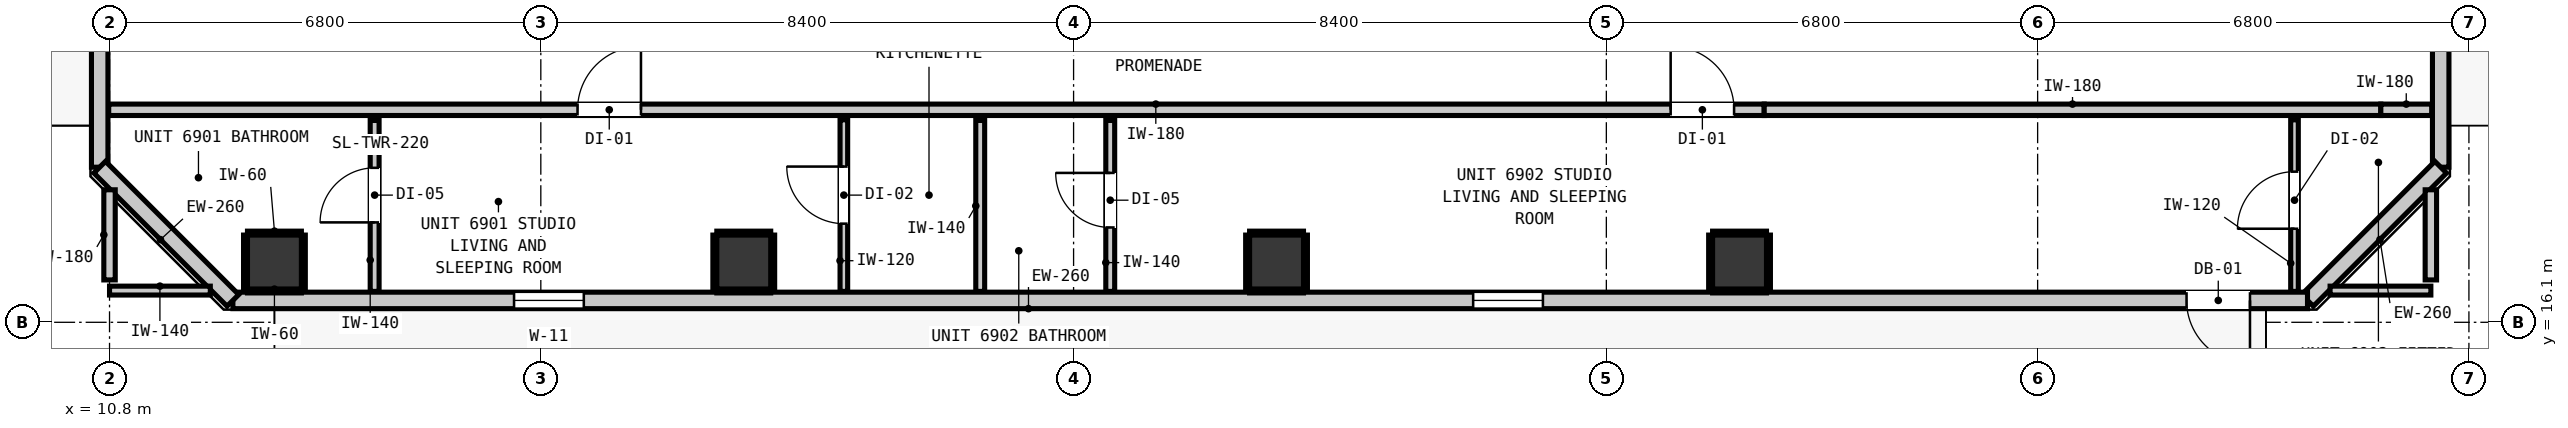
"""IFC4 building model, lengths in metres.
Left out: names, types, materials, properties, quantities, classifications, styles, units other than length and angle.
Written with IfcOpenShell. Run it as: python <this file> out.ifc"""

import sys

from ifc_helpers import new_model, si_unit, direction, frame, frame_2d, origin, origin_2d, place, context, subcontext, project, spatial, rectangle, extrude, element, fill, save


model = new_model("IFC4")
c1 = context("Model", 3, precision=1e-05, world=origin(), true_north=direction((0.0, 1.0)))
c2 = subcontext(c1, "Body", "Model", "MODEL_VIEW")
j1 = project(units=[si_unit("LENGTHUNIT", "METRE"), si_unit("PLANEANGLEUNIT", "RADIAN")], contexts=[c1])
p1 = place(None, origin())
s1 = spatial("IfcSite", under=j1, at=p1, CompositionType="ELEMENT")
p2 = place(p1, origin())
s2 = spatial("IfcBuilding", under=s1, at=p2, CompositionType="ELEMENT")
p3 = place(p2, frame((0.0, 0.0, 237.92)))
s3 = spatial("IfcBuildingStorey", under=s2, at=p3, CompositionType="ELEMENT", Elevation=237.92)
for number, where, z_axis, x_axis in (
    (1, (13.4, 17.05, 0.0), (0.0, 0.0, 1.0), (1.0, 0.0, 0.0)),
    (2, (20.8, 17.05, 0.0), (0.0, 0.0, 1.0), (1.0, 0.0, 0.0)),
    (3, (29.2, 17.05, 0.0), (0.0, 0.0, 1.0), (1.0, 0.0, 0.0)),
    (4, (36.5, 17.05, 0.0), (0.0, 0.0, 1.0), (1.0, 0.0, 0.0)),
):
    element("IfcColumn", number, at=place(p3, frame(where, z_axis=z_axis, x_axis=x_axis)), inside=s3, PredefinedType="COLUMN", context=c2, shape_type="SweptSolid", body=[
        extrude(rectangle(XDim=0.85, YDim=0.85, at=origin_2d()), origin(), (0.0, 0.0, 1.0), 3.32),
    ])
p4 = place(p3, frame((10.645, 18.545, 0.0), z_axis=(0.0, 0.0, 1.0), x_axis=(0.0, 1.0, 0.0)))
e5 = element("IfcWall", 5, at=p4, inside=s3, PredefinedType="STANDARD", context=c2, shape_type="SweptSolid", body=[
    extrude(rectangle(XDim=30.31, YDim=0.26, at=frame_2d((15.155, 0.0))), origin(), (0.0, 0.0, 1.0), 3.1),
])
p5 = place(p4, frame((27.695, 0.0, 0.0)))
e6 = element("IfcOpeningElement", 6, at=p5, cuts=e5, PredefinedType="OPENING", context=c2, shape_type="SweptSolid", body=[
    extrude(rectangle(XDim=1.0, YDim=2.15, at=frame_2d((0.5, 1.075))), frame((0.0, 0.14, 0.0), z_axis=(0.0, -1.0, 0.0), x_axis=(1.0, 0.0, 0.0)), (0.0, 0.0, 1.0), 0.28),
])
p6 = place(p4, frame((29.108, 0.0, 0.85)))
e7 = element("IfcOpeningElement", 7, at=p6, cuts=e5, PredefinedType="OPENING", context=c2, shape_type="SweptSolid", body=[
    extrude(rectangle(XDim=0.9, YDim=1.5, at=frame_2d((0.45, 0.75))), frame((0.0, 0.14, 0.0), z_axis=(0.0, -1.0, 0.0), x_axis=(1.0, 0.0, 0.0)), (0.0, 0.0, 1.0), 0.28),
])
p7 = place(p3, frame((47.555, 48.855, 0.0), z_axis=(0.0, 0.0, 1.0), x_axis=(0.0, -1.0, 0.0)))
e8 = element("IfcWall", 8, at=p7, inside=s3, PredefinedType="STANDARD", context=c2, shape_type="SweptSolid", body=[
    extrude(rectangle(XDim=30.31, YDim=0.26, at=frame_2d((15.155, 0.0))), origin(), (0.0, 0.0, 1.0), 3.1),
])
p8 = place(p7, frame((0.91, 0.0, 0.0)))
e9 = element("IfcOpeningElement", 9, at=p8, cuts=e8, PredefinedType="OPENING", context=c2, shape_type="SweptSolid", body=[
    extrude(rectangle(XDim=1.0, YDim=2.15, at=frame_2d((0.5, 1.075))), frame((0.0, 0.14, 0.0), z_axis=(0.0, -1.0, 0.0), x_axis=(1.0, 0.0, 0.0)), (0.0, 0.0, 1.0), 0.28),
])
p9 = place(p7, frame((3.907, 0.0, 0.85)))
e10 = element("IfcOpeningElement", 10, at=p9, cuts=e8, PredefinedType="OPENING", context=c2, shape_type="SweptSolid", body=[
    extrude(rectangle(XDim=1.1, YDim=2.05, at=frame_2d((0.55, 1.025))), frame((0.0, 0.14, 0.0), z_axis=(0.0, -1.0, 0.0), x_axis=(1.0, 0.0, 0.0)), (0.0, 0.0, 1.0), 0.28),
])
p10 = place(p7, frame((21.955, 0.0, 0.85)))
e11 = element("IfcOpeningElement", 11, at=p10, cuts=e8, PredefinedType="OPENING", context=c2, shape_type="SweptSolid", body=[
    extrude(rectangle(XDim=1.1, YDim=2.05, at=frame_2d((0.55, 1.025))), frame((0.0, 0.14, 0.0), z_axis=(0.0, -1.0, 0.0), x_axis=(1.0, 0.0, 0.0)), (0.0, 0.0, 1.0), 0.28),
])
p11 = place(p3, frame((47.555, 18.545, 0.0), z_axis=(0.0, 0.0, 1.0), x_axis=(-0.707106781187, -0.707106781187, 0.0)))
e12 = element("IfcWall", 12, at=p11, inside=s3, PredefinedType="STANDARD", context=c2, shape_type="SweptSolid", body=[
    extrude(rectangle(XDim=2.97, YDim=0.26, at=frame_2d((1.485, 0.0))), origin(), (0.0, 0.0, 1.0), 3.1),
])
p12 = place(p3, frame((45.455, 16.445, 0.0), z_axis=(0.0, 0.0, 1.0), x_axis=(-1.0, 0.0, 0.0)))
e13 = element("IfcWall", 13, at=p12, inside=s3, PredefinedType="STANDARD", context=c2, shape_type="SweptSolid", body=[
    extrude(rectangle(XDim=32.71, YDim=0.26, at=frame_2d((16.355, 0.0))), origin(), (0.0, 0.0, 1.0), 3.1),
])
p13 = place(p12, frame((0.907, 0.0, 0.0)))
e14 = element("IfcOpeningElement", 14, at=p13, cuts=e13, PredefinedType="OPENING", context=c2, shape_type="SweptSolid", body=[
    extrude(rectangle(XDim=1.0, YDim=2.15, at=frame_2d((0.5, 1.075))), frame((0.0, 0.14, 0.0), z_axis=(0.0, -1.0, 0.0), x_axis=(1.0, 0.0, 0.0)), (0.0, 0.0, 1.0), 0.28),
])
p14 = place(p12, frame((27.177, 0.0, 0.85)))
e15 = element("IfcOpeningElement", 15, at=p14, cuts=e13, PredefinedType="OPENING", context=c2, shape_type="SweptSolid", body=[
    extrude(rectangle(XDim=1.1, YDim=2.05, at=frame_2d((0.55, 1.025))), frame((0.0, 0.14, 0.0), z_axis=(0.0, -1.0, 0.0), x_axis=(1.0, 0.0, 0.0)), (0.0, 0.0, 1.0), 0.28),
])
p15 = place(p12, frame((12.055, 0.0, 0.85)))
e16 = element("IfcOpeningElement", 16, at=p15, cuts=e13, PredefinedType="OPENING", context=c2, shape_type="SweptSolid", body=[
    extrude(rectangle(XDim=1.1, YDim=2.05, at=frame_2d((0.55, 1.025))), frame((0.0, 0.14, 0.0), z_axis=(0.0, -1.0, 0.0), x_axis=(1.0, 0.0, 0.0)), (0.0, 0.0, 1.0), 0.28),
])
p16 = place(p3, frame((12.745, 16.445, 0.0), z_axis=(0.0, 0.0, 1.0), x_axis=(-0.707147883682, 0.707065676302, 0.0)))
e17 = element("IfcWall", 17, at=p16, inside=s3, PredefinedType="STANDARD", context=c2, shape_type="SweptSolid", body=[
    extrude(rectangle(XDim=2.97, YDim=0.26, at=frame_2d((1.485, 0.0))), origin(), (0.0, 0.0, 1.0), 3.1),
])
p17 = place(p3, frame((10.787, 19.45, 0.0), z_axis=(0.0, 0.0, 1.0), x_axis=(1.0, 0.0, 0.0)))
e18 = element("IfcWall", 18, at=p17, inside=s3, PredefinedType="PARTITIONING", context=c2, shape_type="SweptSolid", body=[
    extrude(rectangle(XDim=26.102, YDim=0.18, at=frame_2d((13.051, 0.0))), origin(), (0.0, 0.0, 1.0), 3.1),
])
p18 = place(p17, frame((7.392, 0.0, 0.0)))
e19 = element("IfcOpeningElement", 19, at=p18, cuts=e18, PredefinedType="OPENING", context=c2, shape_type="SweptSolid", body=[
    extrude(rectangle(XDim=1.0, YDim=2.15, at=frame_2d((0.5, 1.075))), frame((0.0, 0.1, 0.0), z_axis=(0.0, -1.0, 0.0), x_axis=(1.0, 0.0, 0.0)), (0.0, 0.0, 1.0), 0.2),
])
p19 = place(p17, frame((24.627, 0.0, 0.0)))
e20 = element("IfcOpeningElement", 20, at=p19, cuts=e18, PredefinedType="OPENING", context=c2, shape_type="SweptSolid", body=[
    extrude(rectangle(XDim=1.0, YDim=2.15, at=frame_2d((0.5, 1.075))), frame((0.0, 0.1, 0.0), z_axis=(0.0, -1.0, 0.0), x_axis=(1.0, 0.0, 0.0)), (0.0, 0.0, 1.0), 0.2),
])
p20 = place(p3, frame((36.889, 19.45, 0.0), z_axis=(0.0, 0.0, 1.0), x_axis=(1.0, 0.0, 0.0)))
e21 = element("IfcWall", 21, at=p20, inside=s3, PredefinedType="PARTITIONING", context=c2, shape_type="SweptSolid", body=[
    extrude(rectangle(XDim=9.722, YDim=0.18, at=frame_2d((4.861, 0.0))), origin(), (0.0, 0.0, 1.0), 2.477),
])
p21 = place(p3, frame((46.611, 19.45, 0.0), z_axis=(0.0, 0.0, 1.0), x_axis=(1.0, 0.0, 0.0)))
e22 = element("IfcWall", 22, at=p21, inside=s3, PredefinedType="PARTITIONING", context=c2, shape_type="SweptSolid", body=[
    extrude(rectangle(XDim=0.802, YDim=0.18, at=frame_2d((0.401, 0.0))), origin(), (0.0, 0.0, 1.0), 3.1),
])
for number, where, z_axis, x_axis in (
    (23, (10.8, 16.6, 0.0), (0.0, 0.0, 1.0), (1.0, 0.0, 0.0)),
    (24, (45.811, 16.6, 0.0), (0.0, 0.0, 1.0), (1.0, 0.0, 0.0)),
):
    element("IfcWall", number, at=place(p3, frame(where, z_axis=z_axis, x_axis=x_axis)), inside=s3, PredefinedType="PARTITIONING", context=c2, shape_type="SweptSolid", body=[
        extrude(rectangle(XDim=1.589, YDim=0.14, at=frame_2d((0.794, 0.0))), origin(), (0.0, 0.0, 1.0), 3.1),
    ])
for number, where, z_axis, x_axis in (
    (25, (10.8, 16.768, 0.0), (0.0, 0.0, 1.0), (0.0, 1.0, 0.0)),
    (26, (47.4, 16.768, 0.0), (0.0, 0.0, 1.0), (0.0, 1.0, 0.0)),
):
    element("IfcWall", number, at=place(p3, frame(where, z_axis=z_axis, x_axis=x_axis)), inside=s3, PredefinedType="PARTITIONING", context=c2, shape_type="SweptSolid", body=[
        extrude(rectangle(XDim=1.421, YDim=0.18, at=frame_2d((0.71, 0.0))), origin(), (0.0, 0.0, 1.0), 3.1),
    ])
p22 = place(p3, frame((14.98, 16.587, 0.0), z_axis=(0.0, 0.0, 1.0), x_axis=(0.0, 1.0, 0.0)))
e27 = element("IfcWall", 27, at=p22, inside=s3, PredefinedType="PARTITIONING", context=c2, shape_type="SweptSolid", body=[
    extrude(rectangle(XDim=2.695, YDim=0.14, at=frame_2d((1.348, 0.0))), origin(), (0.0, 0.0, 1.0), 3.1),
])
p23 = place(p22, frame((1.088, 0.0, 0.0)))
e28 = element("IfcOpeningElement", 28, at=p23, cuts=e27, PredefinedType="OPENING", context=c2, shape_type="SweptSolid", body=[
    extrude(rectangle(XDim=0.86, YDim=2.02, at=frame_2d((0.43, 1.01))), frame((0.0, 0.08, 0.0), z_axis=(0.0, -1.0, 0.0), x_axis=(1.0, 0.0, 0.0)), (0.0, 0.0, 1.0), 0.16),
])
p24 = place(p3, frame((24.528, 16.587, 0.0), z_axis=(0.0, 0.0, 1.0), x_axis=(0.0, 1.0, 0.0)))
e29 = element("IfcWall", 29, at=p24, inside=s3, PredefinedType="PARTITIONING", context=c2, shape_type="SweptSolid", body=[
    extrude(rectangle(XDim=2.695, YDim=0.14, at=frame_2d((1.348, 0.0))), origin(), (0.0, 0.0, 1.0), 3.1),
])
p25 = place(p3, frame((26.578, 16.587, 0.0), z_axis=(0.0, 0.0, 1.0), x_axis=(0.0, 1.0, 0.0)))
e30 = element("IfcWall", 30, at=p25, inside=s3, PredefinedType="PARTITIONING", context=c2, shape_type="SweptSolid", body=[
    extrude(rectangle(XDim=2.695, YDim=0.14, at=frame_2d((1.348, 0.0))), origin(), (0.0, 0.0, 1.0), 3.1),
])
p26 = place(p25, frame((1.008, 0.0, 0.0)))
e31 = element("IfcOpeningElement", 31, at=p26, cuts=e30, PredefinedType="OPENING", context=c2, shape_type="SweptSolid", body=[
    extrude(rectangle(XDim=0.86, YDim=2.02, at=frame_2d((0.43, 1.01))), frame((0.0, 0.08, 0.0), z_axis=(0.0, -1.0, 0.0), x_axis=(1.0, 0.0, 0.0)), (0.0, 0.0, 1.0), 0.16),
])
p27 = place(p3, frame((22.378, 16.587, 0.0), z_axis=(0.0, 0.0, 1.0), x_axis=(0.0, 1.0, 0.0)))
e32 = element("IfcWall", 32, at=p27, inside=s3, PredefinedType="PARTITIONING", context=c2, shape_type="SweptSolid", body=[
    extrude(rectangle(XDim=2.705, YDim=0.12, at=frame_2d((1.353, 0.0))), origin(), (0.0, 0.0, 1.0), 3.1),
])
p28 = place(p27, frame((1.068, 0.0, 0.0)))
e33 = element("IfcOpeningElement", 33, at=p28, cuts=e32, PredefinedType="OPENING", context=c2, shape_type="SweptSolid", body=[
    extrude(rectangle(XDim=0.9, YDim=2.1, at=frame_2d((0.45, 1.05))), frame((0.0, 0.07, 0.0), z_axis=(0.0, -1.0, 0.0), x_axis=(1.0, 0.0, 0.0)), (0.0, 0.0, 1.0), 0.14),
])
p29 = place(p3, frame((45.25, 16.587, 0.0), z_axis=(0.0, 0.0, 1.0), x_axis=(0.0, 1.0, 0.0)))
e34 = element("IfcWall", 34, at=p29, inside=s3, PredefinedType="PARTITIONING", context=c2, shape_type="SweptSolid", body=[
    extrude(rectangle(XDim=2.705, YDim=0.12, at=frame_2d((1.353, 0.0))), origin(), (0.0, 0.0, 1.0), 3.1),
])
p30 = place(p29, frame((0.988, 0.0, 0.0)))
e35 = element("IfcOpeningElement", 35, at=p30, cuts=e34, PredefinedType="OPENING", context=c2, shape_type="SweptSolid", body=[
    extrude(rectangle(XDim=0.9, YDim=2.1, at=frame_2d((0.45, 1.05))), frame((0.0, 0.07, 0.0), z_axis=(0.0, -1.0, 0.0), x_axis=(1.0, 0.0, 0.0)), (0.0, 0.0, 1.0), 0.14),
])
for number, where, z_axis, x_axis in (
    (36, (12.975, 16.593, 0.0), (0.0, 0.0, 1.0), (1.0, 0.0, 0.0)),
    (37, (12.975, 17.507, 0.0), (0.0, 0.0, 1.0), (1.0, 0.0, 0.0)),
):
    element("IfcWall", number, at=place(p3, frame(where, z_axis=z_axis, x_axis=x_axis)), inside=s3, PredefinedType="PARTITIONING", context=c2, shape_type="SweptSolid", body=[
        extrude(rectangle(XDim=0.85, YDim=0.06, at=frame_2d((0.425, 0.0))), origin(), (0.0, 0.0, 1.0), 1.45),
    ])
for number, where, z_axis, x_axis in (
    (38, (12.943, 16.625, 0.0), (0.0, 0.0, 1.0), (0.0, 1.0, 0.0)),
    (39, (13.857, 16.625, 0.0), (0.0, 0.0, 1.0), (0.0, 1.0, 0.0)),
    (40, (20.375, 16.593, 0.0), (0.0, 0.0, 1.0), (1.0, 0.0, 0.0)),
    (41, (20.375, 17.507, 0.0), (0.0, 0.0, 1.0), (1.0, 0.0, 0.0)),
    (42, (20.343, 16.625, 0.0), (0.0, 0.0, 1.0), (0.0, 1.0, 0.0)),
    (43, (21.257, 16.625, 0.0), (0.0, 0.0, 1.0), (0.0, 1.0, 0.0)),
    (44, (28.775, 16.593, 0.0), (0.0, 0.0, 1.0), (1.0, 0.0, 0.0)),
    (45, (28.775, 17.507, 0.0), (0.0, 0.0, 1.0), (1.0, 0.0, 0.0)),
    (46, (28.743, 16.625, 0.0), (0.0, 0.0, 1.0), (0.0, 1.0, 0.0)),
    (47, (29.657, 16.625, 0.0), (0.0, 0.0, 1.0), (0.0, 1.0, 0.0)),
    (48, (36.075, 16.593, 0.0), (0.0, 0.0, 1.0), (1.0, 0.0, 0.0)),
    (49, (36.075, 17.507, 0.0), (0.0, 0.0, 1.0), (1.0, 0.0, 0.0)),
    (50, (36.043, 16.625, 0.0), (0.0, 0.0, 1.0), (0.0, 1.0, 0.0)),
    (51, (36.957, 16.625, 0.0), (0.0, 0.0, 1.0), (0.0, 1.0, 0.0)),
):
    element("IfcWall", number, at=place(p3, frame(where, z_axis=z_axis, x_axis=x_axis)), inside=s3, PredefinedType="PARTITIONING", context=c2, shape_type="SweptSolid", body=[
        extrude(rectangle(XDim=0.85, YDim=0.06, at=frame_2d((0.425, 0.0))), origin(), (0.0, 0.0, 1.0), 1.45),
    ])
p31 = place(p13, origin())
e52 = element("IfcDoor", 52, at=p31, inside=s3, OperationType="SINGLE_SWING_LEFT", PredefinedType="DOOR", context=c2, shape_type="SweptSolid", body=[
    extrude(rectangle(XDim=1.0, YDim=2.15, at=frame_2d((0.5, 1.075))), frame((0.0, 0.025, 0.0), z_axis=(0.0, -1.0, 0.0), x_axis=(1.0, 0.0, 0.0)), (0.0, 0.0, 1.0), 0.05),
])
fill(e14, e52)
p32 = place(p14, origin())
e53 = element("IfcWindow", 53, at=p32, inside=s3, PartitioningType="SINGLE_PANEL", PredefinedType="WINDOW", context=c2, shape_type="SweptSolid", body=[
    extrude(rectangle(XDim=1.1, YDim=2.05, at=frame_2d((0.55, 1.025))), frame((0.0, 0.03, 0.0), z_axis=(0.0, -1.0, 0.0), x_axis=(1.0, 0.0, 0.0)), (0.0, 0.0, 1.0), 0.06),
])
fill(e15, e53)
p33 = place(p15, origin())
e54 = element("IfcWindow", 54, at=p33, inside=s3, PartitioningType="SINGLE_PANEL", PredefinedType="WINDOW", context=c2, shape_type="SweptSolid", body=[
    extrude(rectangle(XDim=1.1, YDim=2.05, at=frame_2d((0.55, 1.025))), frame((0.0, 0.03, 0.0), z_axis=(0.0, -1.0, 0.0), x_axis=(1.0, 0.0, 0.0)), (0.0, 0.0, 1.0), 0.06),
])
fill(e16, e54)
p34 = place(p18, origin())
e55 = element("IfcDoor", 55, at=p34, inside=s3, OperationType="SINGLE_SWING_RIGHT", PredefinedType="DOOR", context=c2, shape_type="SweptSolid", body=[
    extrude(rectangle(XDim=1.0, YDim=2.15, at=frame_2d((0.5, 1.075))), frame((0.0, 0.025, 0.0), z_axis=(0.0, -1.0, 0.0), x_axis=(1.0, 0.0, 0.0)), (0.0, 0.0, 1.0), 0.05),
])
fill(e19, e55)
p35 = place(p23, origin())
e56 = element("IfcDoor", 56, at=p35, inside=s3, OperationType="SINGLE_SWING_LEFT", PredefinedType="DOOR", context=c2, shape_type="SweptSolid", body=[
    extrude(rectangle(XDim=0.86, YDim=2.02, at=frame_2d((0.43, 1.01))), frame((0.0, 0.025, 0.0), z_axis=(0.0, -1.0, 0.0), x_axis=(1.0, 0.0, 0.0)), (0.0, 0.0, 1.0), 0.05),
])
fill(e28, e56)
p36 = place(p28, origin())
e57 = element("IfcDoor", 57, at=p36, inside=s3, OperationType="SINGLE_SWING_RIGHT", PredefinedType="DOOR", context=c2, shape_type="SweptSolid", body=[
    extrude(rectangle(XDim=0.9, YDim=2.1, at=frame_2d((0.45, 1.05))), frame((0.0, 0.025, 0.0), z_axis=(0.0, -1.0, 0.0), x_axis=(1.0, 0.0, 0.0)), (0.0, 0.0, 1.0), 0.05),
])
fill(e33, e57)
p37 = place(p19, origin())
e58 = element("IfcDoor", 58, at=p37, inside=s3, OperationType="SINGLE_SWING_LEFT", PredefinedType="DOOR", context=c2, shape_type="SweptSolid", body=[
    extrude(rectangle(XDim=1.0, YDim=2.15, at=frame_2d((0.5, 1.075))), frame((0.0, 0.025, 0.0), z_axis=(0.0, -1.0, 0.0), x_axis=(1.0, 0.0, 0.0)), (0.0, 0.0, 1.0), 0.05),
])
fill(e20, e58)
p38 = place(p26, origin())
e59 = element("IfcDoor", 59, at=p38, inside=s3, OperationType="SINGLE_SWING_RIGHT", PredefinedType="DOOR", context=c2, shape_type="SweptSolid", body=[
    extrude(rectangle(XDim=0.86, YDim=2.02, at=frame_2d((0.43, 1.01))), frame((0.0, 0.025, 0.0), z_axis=(0.0, -1.0, 0.0), x_axis=(1.0, 0.0, 0.0)), (0.0, 0.0, 1.0), 0.05),
])
fill(e31, e59)
p39 = place(p30, origin())
e60 = element("IfcDoor", 60, at=p39, inside=s3, OperationType="SINGLE_SWING_LEFT", PredefinedType="DOOR", context=c2, shape_type="SweptSolid", body=[
    extrude(rectangle(XDim=0.9, YDim=2.1, at=frame_2d((0.45, 1.05))), frame((0.0, 0.025, 0.0), z_axis=(0.0, -1.0, 0.0), x_axis=(1.0, 0.0, 0.0)), (0.0, 0.0, 1.0), 0.05),
])
fill(e35, e60)
save(model, sys.argv[1])
